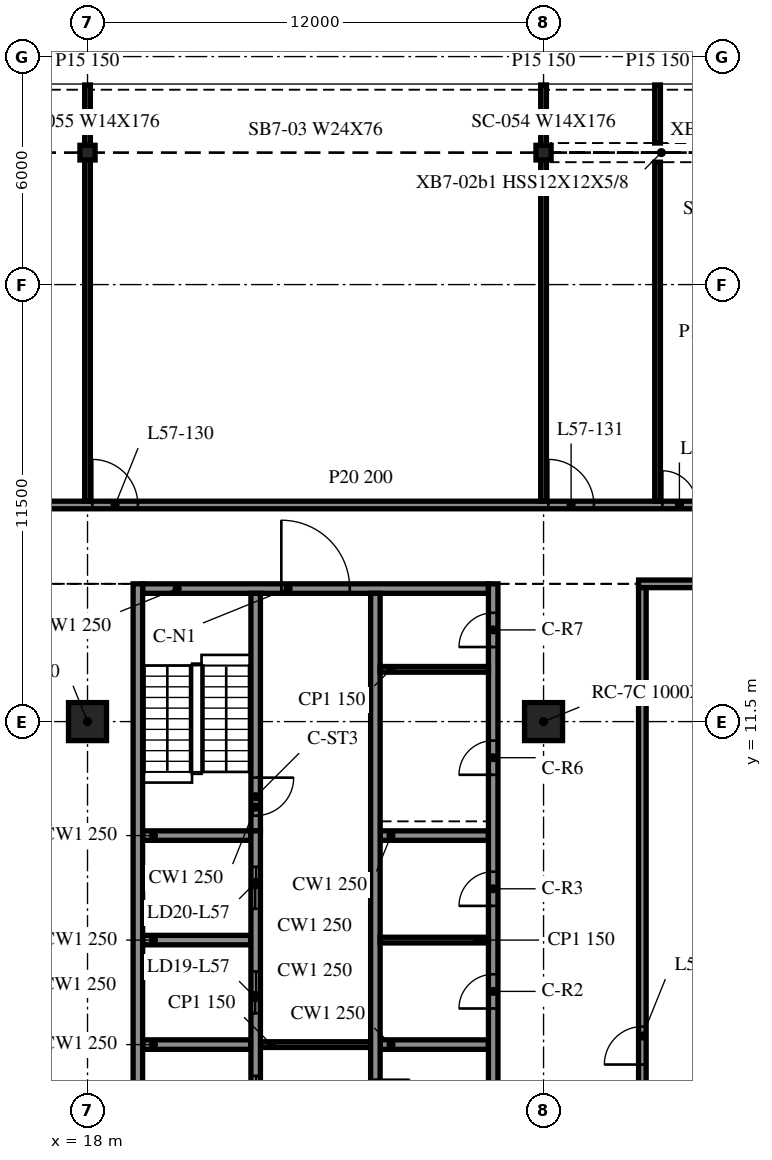
"""IFC4 building model, lengths in metres.
Left out: names, types, materials, properties, quantities, classifications, styles, units other than length and angle.
Written with IfcOpenShell. Run it as: python <this file> out.ifc"""

import sys

from ifc_helpers import new_model, si_unit, direction, frame, frame_2d, origin, origin_2d, place, context, subcontext, project, spatial, rectangle, i_section, extrude, element, fill, save


model = new_model("IFC4")
c1 = context("Model", 3, precision=1e-05, world=origin(), true_north=direction((0.0, 1.0)))
c2 = subcontext(c1, "Body", "Model", "MODEL_VIEW")
j1 = project(units=[si_unit("LENGTHUNIT", "METRE"), si_unit("PLANEANGLEUNIT", "RADIAN")], contexts=[c1])
p1 = place(None, origin())
s1 = spatial("IfcSite", under=j1, at=p1, CompositionType="ELEMENT")
p2 = place(p1, origin())
s2 = spatial("IfcBuilding", under=s1, at=p2, CompositionType="ELEMENT")
p3 = place(p2, frame((0.0, 0.0, 236.2)))
s3 = spatial("IfcBuildingStorey", under=s2, at=p3, CompositionType="ELEMENT", Elevation=236.2)
for number, where, z_axis, x_axis in (
    (1, (18.0, 11.5, -0.34), (0.0, 0.0, 1.0), (1.0, 0.0, 0.0)),
    (2, (30.0, 11.5, -0.34), (0.0, 0.0, 1.0), (1.0, 0.0, 0.0)),
):
    element("IfcColumn", number, at=place(p3, frame(where, z_axis=z_axis, x_axis=x_axis)), inside=s3, PredefinedType="COLUMN", context=c2, shape_type="SweptSolid", body=[
        extrude(rectangle(XDim=1.0, YDim=1.0, at=origin_2d()), origin(), (0.0, 0.0, 1.0), 3.8),
    ])
for number, where, z_axis, x_axis in (
    (3, (30.0, 26.473, -0.34), (0.0, 0.0, 1.0), (1.0, 0.0, 0.0)),
    (4, (18.0, 26.473, -0.34), (0.0, 0.0, 1.0), (1.0, 0.0, 0.0)),
):
    element("IfcColumn", number, at=place(p3, frame(where, z_axis=z_axis, x_axis=x_axis)), inside=s3, PredefinedType="COLUMN", context=c2, shape_type="SweptSolid", body=[
        extrude(i_section(OverallWidth=0.399, OverallDepth=0.386, WebThickness=0.021, FlangeThickness=0.033, at=origin_2d()), origin(), (0.0, 0.0, 1.0), 3.8),
    ])
p4 = place(p3, frame((19.325, 15.125, 0.0), z_axis=(0.0, 0.0, 1.0), x_axis=(0.0, -1.0, 0.0)))
e5 = element("IfcWall", 5, at=p4, inside=s3, PredefinedType="SOLIDWALL", context=c2, shape_type="SweptSolid", body=[
    extrude(rectangle(XDim=24.25, YDim=0.25, at=frame_2d((12.125, 0.0))), origin(), (0.0, 0.0, 1.0), 3.46),
])
p5 = place(p3, frame((28.675, -9.125, 0.0), z_axis=(0.0, 0.0, 1.0), x_axis=(0.0, 1.0, 0.0)))
e6 = element("IfcWall", 6, at=p5, inside=s3, PredefinedType="SOLIDWALL", context=c2, shape_type="SweptSolid", body=[
    extrude(rectangle(XDim=24.25, YDim=0.25, at=frame_2d((12.125, 0.0))), origin(), (0.0, 0.0, 1.0), 3.46),
])
p6 = place(p5, frame((13.075, 0.0, 0.0)))
e7 = element("IfcOpeningElement", 7, at=p6, cuts=e6, PredefinedType="OPENING", context=c2, shape_type="SweptSolid", body=[
    extrude(rectangle(XDim=0.9, YDim=2.1, at=frame_2d((0.45, 1.05))), frame((0.0, 0.135, 0.0), z_axis=(0.0, -1.0, 0.0), x_axis=(1.0, 0.0, 0.0)), (0.0, 0.0, 1.0), 0.27),
])
p7 = place(p5, frame((15.775, 0.0, 0.0)))
e8 = element("IfcOpeningElement", 8, at=p7, cuts=e6, PredefinedType="OPENING", context=c2, shape_type="SweptSolid", body=[
    extrude(rectangle(XDim=0.9, YDim=2.1, at=frame_2d((0.45, 1.05))), frame((0.0, 0.135, 0.0), z_axis=(0.0, -1.0, 0.0), x_axis=(1.0, 0.0, 0.0)), (0.0, 0.0, 1.0), 0.27),
])
p8 = place(p5, frame((19.225, 0.0, 0.0)))
e9 = element("IfcOpeningElement", 9, at=p8, cuts=e6, PredefinedType="OPENING", context=c2, shape_type="SweptSolid", body=[
    extrude(rectangle(XDim=0.9, YDim=2.1, at=frame_2d((0.45, 1.05))), frame((0.0, 0.135, 0.0), z_axis=(0.0, -1.0, 0.0), x_axis=(1.0, 0.0, 0.0)), (0.0, 0.0, 1.0), 0.27),
])
p9 = place(p5, frame((22.587, 0.0, 0.0)))
e10 = element("IfcOpeningElement", 10, at=p9, cuts=e6, PredefinedType="OPENING", context=c2, shape_type="SweptSolid", body=[
    extrude(rectangle(XDim=0.9, YDim=2.1, at=frame_2d((0.45, 1.05))), frame((0.0, 0.135, 0.0), z_axis=(0.0, -1.0, 0.0), x_axis=(1.0, 0.0, 0.0)), (0.0, 0.0, 1.0), 0.27),
])
p10 = place(p3, frame((19.45, 15.0, 0.0), z_axis=(0.0, 0.0, 1.0), x_axis=(1.0, 0.0, 0.0)))
e11 = element("IfcWall", 11, at=p10, inside=s3, PredefinedType="SOLIDWALL", context=c2, shape_type="SweptSolid", body=[
    extrude(rectangle(XDim=9.1, YDim=0.25, at=frame_2d((4.55, 0.0))), origin(), (0.0, 0.0, 1.0), 3.46),
])
p11 = place(p10, frame((3.65, 0.0, 0.0)))
e12 = element("IfcOpeningElement", 12, at=p11, cuts=e11, PredefinedType="OPENING", context=c2, shape_type="SweptSolid", body=[
    extrude(rectangle(XDim=1.8, YDim=2.1, at=frame_2d((0.9, 1.05))), frame((0.0, 0.135, 0.0), z_axis=(0.0, -1.0, 0.0), x_axis=(1.0, 0.0, 0.0)), (0.0, 0.0, 1.0), 0.27),
])
p12 = place(p3, frame((22.425, -8.875, 0.0), z_axis=(0.0, 0.0, 1.0), x_axis=(0.0, 1.0, 0.0)))
e13 = element("IfcWall", 13, at=p12, inside=s3, PredefinedType="SOLIDWALL", context=c2, shape_type="SweptSolid", body=[
    extrude(rectangle(XDim=17.5, YDim=0.25, at=frame_2d((8.75, 0.0))), origin(), (0.0, 0.0, 1.0), 3.46),
])
p13 = place(p12, frame((7.2, 0.0, 0.0)))
e14 = element("IfcOpeningElement", 14, at=p13, cuts=e13, PredefinedType="OPENING", context=c2, shape_type="SweptSolid", body=[
    extrude(rectangle(XDim=1.1, YDim=2.1, at=frame_2d((0.55, 1.05))), frame((0.0, 0.135, 0.0), z_axis=(0.0, -1.0, 0.0), x_axis=(1.0, 0.0, 0.0)), (0.0, 0.0, 1.0), 0.27),
])
p14 = place(p12, frame((9.95, 0.0, 0.0)))
e15 = element("IfcOpeningElement", 15, at=p14, cuts=e13, PredefinedType="OPENING", context=c2, shape_type="SweptSolid", body=[
    extrude(rectangle(XDim=1.1, YDim=2.1, at=frame_2d((0.55, 1.05))), frame((0.0, 0.135, 0.0), z_axis=(0.0, -1.0, 0.0), x_axis=(1.0, 0.0, 0.0)), (0.0, 0.0, 1.0), 0.27),
])
p15 = place(p12, frame((12.7, 0.0, 0.0)))
e16 = element("IfcOpeningElement", 16, at=p15, cuts=e13, PredefinedType="OPENING", context=c2, shape_type="SweptSolid", body=[
    extrude(rectangle(XDim=1.1, YDim=2.1, at=frame_2d((0.55, 1.05))), frame((0.0, 0.135, 0.0), z_axis=(0.0, -1.0, 0.0), x_axis=(1.0, 0.0, 0.0)), (0.0, 0.0, 1.0), 0.27),
])
p16 = place(p12, frame((15.45, 0.0, 0.0)))
e17 = element("IfcOpeningElement", 17, at=p16, cuts=e13, PredefinedType="OPENING", context=c2, shape_type="SweptSolid", body=[
    extrude(rectangle(XDim=1.1, YDim=2.1, at=frame_2d((0.55, 1.05))), frame((0.0, 0.135, 0.0), z_axis=(0.0, -1.0, 0.0), x_axis=(1.0, 0.0, 0.0)), (0.0, 0.0, 1.0), 0.27),
])
p17 = place(p12, frame((0.512, 0.0, 0.0)))
e18 = element("IfcOpeningElement", 18, at=p17, cuts=e13, PredefinedType="OPENING", context=c2, shape_type="SweptSolid", body=[
    extrude(rectangle(XDim=0.9, YDim=2.1, at=frame_2d((0.45, 1.05))), frame((0.0, 0.135, 0.0), z_axis=(0.0, -1.0, 0.0), x_axis=(1.0, 0.0, 0.0)), (0.0, 0.0, 1.0), 0.27),
])
p18 = place(p12, frame((3.587, 0.0, 0.0)))
e19 = element("IfcOpeningElement", 19, at=p18, cuts=e13, PredefinedType="OPENING", context=c2, shape_type="SweptSolid", body=[
    extrude(rectangle(XDim=0.9, YDim=2.1, at=frame_2d((0.45, 1.05))), frame((0.0, 0.135, 0.0), z_axis=(0.0, -1.0, 0.0), x_axis=(1.0, 0.0, 0.0)), (0.0, 0.0, 1.0), 0.27),
])
p19 = place(p3, frame((22.425, 14.875, 0.0), z_axis=(0.0, 0.0, 1.0), x_axis=(0.0, -1.0, 0.0)))
e20 = element("IfcWall", 20, at=p19, inside=s3, PredefinedType="SOLIDWALL", context=c2, shape_type="SweptSolid", body=[
    extrude(rectangle(XDim=6.25, YDim=0.25, at=frame_2d((3.125, 0.0))), origin(), (0.0, 0.0, 1.0), 3.46),
])
p20 = place(p19, frame((4.85, 0.0, 0.0)))
e21 = element("IfcOpeningElement", 21, at=p20, cuts=e20, PredefinedType="OPENING", context=c2, shape_type="SweptSolid", body=[
    extrude(rectangle(XDim=1.0, YDim=2.1, at=frame_2d((0.5, 1.05))), frame((0.0, 0.135, 0.0), z_axis=(0.0, -1.0, 0.0), x_axis=(1.0, 0.0, 0.0)), (0.0, 0.0, 1.0), 0.27),
])
p21 = place(p3, frame((25.575, 14.875, 0.0), z_axis=(0.0, 0.0, 1.0), x_axis=(0.0, -1.0, 0.0)))
e22 = element("IfcWall", 22, at=p21, inside=s3, PredefinedType="SOLIDWALL", context=c2, shape_type="SweptSolid", body=[
    extrude(rectangle(XDim=17.5, YDim=0.25, at=frame_2d((8.75, 0.0))), origin(), (0.0, 0.0, 1.0), 3.46),
])
p22 = place(p21, frame((15.45, 0.0, 0.0)))
e23 = element("IfcOpeningElement", 23, at=p22, cuts=e22, PredefinedType="OPENING", context=c2, shape_type="SweptSolid", body=[
    extrude(rectangle(XDim=1.1, YDim=2.1, at=frame_2d((0.55, 1.05))), frame((0.0, 0.135, 0.0), z_axis=(0.0, -1.0, 0.0), x_axis=(1.0, 0.0, 0.0)), (0.0, 0.0, 1.0), 0.27),
])
p23 = place(p21, frame((12.8, 0.0, 0.0)))
e24 = element("IfcOpeningElement", 24, at=p23, cuts=e22, PredefinedType="OPENING", context=c2, shape_type="SweptSolid", body=[
    extrude(rectangle(XDim=0.9, YDim=2.1, at=frame_2d((0.45, 1.05))), frame((0.0, 0.135, 0.0), z_axis=(0.0, -1.0, 0.0), x_axis=(1.0, 0.0, 0.0)), (0.0, 0.0, 1.0), 0.27),
])
for number, where, z_axis, x_axis in (
    (25, (19.45, 3.0, 0.0), (0.0, 0.0, 1.0), (1.0, 0.0, 0.0)),
    (26, (19.45, 5.75, 0.0), (0.0, 0.0, 1.0), (1.0, 0.0, 0.0)),
    (27, (19.45, 8.5, 0.0), (0.0, 0.0, 1.0), (1.0, 0.0, 0.0)),
    (28, (25.7, 3.0, 0.0), (0.0, 0.0, 1.0), (1.0, 0.0, 0.0)),
    (29, (25.7, 8.5, 0.0), (0.0, 0.0, 1.0), (1.0, 0.0, 0.0)),
):
    element("IfcWall", number, at=place(p3, frame(where, z_axis=z_axis, x_axis=x_axis)), inside=s3, PredefinedType="SOLIDWALL", context=c2, shape_type="SweptSolid", body=[
        extrude(rectangle(XDim=2.85, YDim=0.25, at=frame_2d((1.425, 0.0))), origin(), (0.0, 0.0, 1.0), 3.46),
    ])
p24 = place(p3, frame((22.55, 3.0, 0.0), z_axis=(0.0, 0.0, 1.0), x_axis=(1.0, 0.0, 0.0)))
e30 = element("IfcWall", 30, at=p24, inside=s3, PredefinedType="PARTITIONING", context=c2, shape_type="SweptSolid", body=[
    extrude(rectangle(XDim=2.9, YDim=0.15, at=frame_2d((1.45, 0.0))), origin(), (0.0, 0.0, 1.0), 3.46),
])
for number, where, z_axis, x_axis in (
    (31, (25.7, 5.75, 0.0), (0.0, 0.0, 1.0), (1.0, 0.0, 0.0)),
    (32, (25.7, 12.875, 0.0), (0.0, 0.0, 1.0), (1.0, 0.0, 0.0)),
):
    element("IfcWall", number, at=place(p3, frame(where, z_axis=z_axis, x_axis=x_axis)), inside=s3, PredefinedType="PARTITIONING", context=c2, shape_type="SweptSolid", body=[
        extrude(rectangle(XDim=2.85, YDim=0.15, at=frame_2d((1.425, 0.0))), origin(), (0.0, 0.0, 1.0), 3.46),
    ])
p25 = place(p3, frame((32.5, 15.125, 0.0), z_axis=(0.0, 0.0, 1.0), x_axis=(1.0, 0.0, 0.0)))
e33 = element("IfcWall", 33, at=p25, inside=s3, PredefinedType="PARTITIONING", context=c2, shape_type="SweptSolid", body=[
    extrude(rectangle(XDim=21.475, YDim=0.2, at=frame_2d((10.738, 0.0))), origin(), (0.0, 0.0, 1.0), 3.46),
])
p26 = place(p3, frame((-41.975, 17.2, 0.0), z_axis=(0.0, 0.0, 1.0), x_axis=(1.0, 0.0, 0.0)))
e34 = element("IfcWall", 34, at=p26, inside=s3, PredefinedType="PARTITIONING", context=c2, shape_type="SweptSolid", body=[
    extrude(rectangle(XDim=95.95, YDim=0.2, at=frame_2d((47.975, 0.0))), origin(), (0.0, 0.0, 1.0), 3.46),
])
p27 = place(p26, frame((10.7, 0.0, 0.0)))
e35 = element("IfcOpeningElement", 35, at=p27, cuts=e34, PredefinedType="OPENING", context=c2, shape_type="SweptSolid", body=[
    extrude(rectangle(XDim=0.9, YDim=2.1, at=frame_2d((0.45, 1.05))), frame((0.0, 0.11, 0.0), z_axis=(0.0, -1.0, 0.0), x_axis=(1.0, 0.0, 0.0)), (0.0, 0.0, 1.0), 0.22),
])
p28 = place(p26, frame((13.3, 0.0, 0.0)))
e36 = element("IfcOpeningElement", 36, at=p28, cuts=e34, PredefinedType="OPENING", context=c2, shape_type="SweptSolid", body=[
    extrude(rectangle(XDim=1.2, YDim=2.1, at=frame_2d((0.6, 1.05))), frame((0.0, 0.11, 0.0), z_axis=(0.0, -1.0, 0.0), x_axis=(1.0, 0.0, 0.0)), (0.0, 0.0, 1.0), 0.22),
])
p29 = place(p26, frame((22.7, 0.0, 0.0)))
e37 = element("IfcOpeningElement", 37, at=p29, cuts=e34, PredefinedType="OPENING", context=c2, shape_type="SweptSolid", body=[
    extrude(rectangle(XDim=0.9, YDim=2.1, at=frame_2d((0.45, 1.05))), frame((0.0, 0.11, 0.0), z_axis=(0.0, -1.0, 0.0), x_axis=(1.0, 0.0, 0.0)), (0.0, 0.0, 1.0), 0.22),
])
p30 = place(p26, frame((28.3, 0.0, 0.0)))
e38 = element("IfcOpeningElement", 38, at=p30, cuts=e34, PredefinedType="OPENING", context=c2, shape_type="SweptSolid", body=[
    extrude(rectangle(XDim=1.2, YDim=2.1, at=frame_2d((0.6, 1.05))), frame((0.0, 0.11, 0.0), z_axis=(0.0, -1.0, 0.0), x_axis=(1.0, 0.0, 0.0)), (0.0, 0.0, 1.0), 0.22),
])
p31 = place(p26, frame((40.3, 0.0, 0.0)))
e39 = element("IfcOpeningElement", 39, at=p31, cuts=e34, PredefinedType="OPENING", context=c2, shape_type="SweptSolid", body=[
    extrude(rectangle(XDim=1.2, YDim=2.1, at=frame_2d((0.6, 1.05))), frame((0.0, 0.11, 0.0), z_axis=(0.0, -1.0, 0.0), x_axis=(1.0, 0.0, 0.0)), (0.0, 0.0, 1.0), 0.22),
])
p32 = place(p26, frame((43.7, 0.0, 0.0)))
e40 = element("IfcOpeningElement", 40, at=p32, cuts=e34, PredefinedType="OPENING", context=c2, shape_type="SweptSolid", body=[
    extrude(rectangle(XDim=0.9, YDim=2.1, at=frame_2d((0.45, 1.05))), frame((0.0, 0.11, 0.0), z_axis=(0.0, -1.0, 0.0), x_axis=(1.0, 0.0, 0.0)), (0.0, 0.0, 1.0), 0.22),
])
p33 = place(p26, frame((47.3, 0.0, 0.0)))
e41 = element("IfcOpeningElement", 41, at=p33, cuts=e34, PredefinedType="OPENING", context=c2, shape_type="SweptSolid", body=[
    extrude(rectangle(XDim=1.2, YDim=2.1, at=frame_2d((0.6, 1.05))), frame((0.0, 0.11, 0.0), z_axis=(0.0, -1.0, 0.0), x_axis=(1.0, 0.0, 0.0)), (0.0, 0.0, 1.0), 0.22),
])
p34 = place(p26, frame((54.1, 0.0, 0.0)))
e42 = element("IfcOpeningElement", 42, at=p34, cuts=e34, PredefinedType="OPENING", context=c2, shape_type="SweptSolid", body=[
    extrude(rectangle(XDim=0.9, YDim=2.1, at=frame_2d((0.45, 1.05))), frame((0.0, 0.11, 0.0), z_axis=(0.0, -1.0, 0.0), x_axis=(1.0, 0.0, 0.0)), (0.0, 0.0, 1.0), 0.22),
])
p35 = place(p26, frame((60.1, 0.0, 0.0)))
e43 = element("IfcOpeningElement", 43, at=p35, cuts=e34, PredefinedType="OPENING", context=c2, shape_type="SweptSolid", body=[
    extrude(rectangle(XDim=1.2, YDim=2.1, at=frame_2d((0.6, 1.05))), frame((0.0, 0.11, 0.0), z_axis=(0.0, -1.0, 0.0), x_axis=(1.0, 0.0, 0.0)), (0.0, 0.0, 1.0), 0.22),
])
p36 = place(p26, frame((72.1, 0.0, 0.0)))
e44 = element("IfcOpeningElement", 44, at=p36, cuts=e34, PredefinedType="OPENING", context=c2, shape_type="SweptSolid", body=[
    extrude(rectangle(XDim=1.2, YDim=2.1, at=frame_2d((0.6, 1.05))), frame((0.0, 0.11, 0.0), z_axis=(0.0, -1.0, 0.0), x_axis=(1.0, 0.0, 0.0)), (0.0, 0.0, 1.0), 0.22),
])
p37 = place(p26, frame((75.1, 0.0, 0.0)))
e45 = element("IfcOpeningElement", 45, at=p37, cuts=e34, PredefinedType="OPENING", context=c2, shape_type="SweptSolid", body=[
    extrude(rectangle(XDim=0.9, YDim=2.1, at=frame_2d((0.45, 1.05))), frame((0.0, 0.11, 0.0), z_axis=(0.0, -1.0, 0.0), x_axis=(1.0, 0.0, 0.0)), (0.0, 0.0, 1.0), 0.22),
])
p38 = place(p26, frame((84.1, 0.0, 0.0)))
e46 = element("IfcOpeningElement", 46, at=p38, cuts=e34, PredefinedType="OPENING", context=c2, shape_type="SweptSolid", body=[
    extrude(rectangle(XDim=1.2, YDim=2.1, at=frame_2d((0.6, 1.05))), frame((0.0, 0.11, 0.0), z_axis=(0.0, -1.0, 0.0), x_axis=(1.0, 0.0, 0.0)), (0.0, 0.0, 1.0), 0.22),
])
p39 = place(p26, frame((90.1, 0.0, 0.0)))
e47 = element("IfcOpeningElement", 47, at=p39, cuts=e34, PredefinedType="OPENING", context=c2, shape_type="SweptSolid", body=[
    extrude(rectangle(XDim=0.9, YDim=2.1, at=frame_2d((0.45, 1.05))), frame((0.0, 0.11, 0.0), z_axis=(0.0, -1.0, 0.0), x_axis=(1.0, 0.0, 0.0)), (0.0, 0.0, 1.0), 0.22),
])
for number, where, z_axis, x_axis in (
    (48, (18.0, 17.3, 0.0), (0.0, 0.0, 1.0), (0.0, 1.0, 0.0)),
    (49, (30.0, 17.3, 0.0), (0.0, 0.0, 1.0), (0.0, 1.0, 0.0)),
):
    element("IfcWall", number, at=place(p3, frame(where, z_axis=z_axis, x_axis=x_axis)), inside=s3, PredefinedType="PARTITIONING", context=c2, shape_type="SweptSolid", body=[
        extrude(rectangle(XDim=10.953, YDim=0.15, at=frame_2d((5.477, 0.0))), origin(), (0.0, 0.0, 1.0), 3.46),
    ])
p40 = place(p3, frame((32.6, -9.025, 0.0), z_axis=(0.0, 0.0, 1.0), x_axis=(0.0, 1.0, 0.0)))
e50 = element("IfcWall", 50, at=p40, inside=s3, PredefinedType="PARTITIONING", context=c2, shape_type="SweptSolid", body=[
    extrude(rectangle(XDim=24.05, YDim=0.2, at=frame_2d((12.025, 0.0))), origin(), (0.0, 0.0, 1.0), 3.46),
])
p41 = place(p40, frame((11.5, 0.0, 0.0)))
e51 = element("IfcOpeningElement", 51, at=p41, cuts=e50, PredefinedType="OPENING", context=c2, shape_type="SweptSolid", body=[
    extrude(rectangle(XDim=1.0, YDim=2.1, at=frame_2d((0.5, 1.05))), frame((0.0, 0.11, 0.0), z_axis=(0.0, -1.0, 0.0), x_axis=(1.0, 0.0, 0.0)), (0.0, 0.0, 1.0), 0.22),
])
p42 = place(p3, frame((33.0, 17.3, 0.0), z_axis=(0.0, 0.0, 1.0), x_axis=(0.0, 1.0, 0.0)))
e52 = element("IfcWall", 52, at=p42, inside=s3, PredefinedType="PARTITIONING", context=c2, shape_type="SweptSolid", body=[
    extrude(rectangle(XDim=8.921, YDim=0.15, at=frame_2d((4.46, 0.0))), origin(), (0.0, 0.0, 1.0), 3.46),
])
p43 = place(p3, frame((33.0, 26.725, 0.0), z_axis=(0.0, 0.0, 1.0), x_axis=(0.0, 1.0, 0.0)))
e53 = element("IfcWall", 53, at=p43, inside=s3, PredefinedType="PARTITIONING", context=c2, shape_type="SweptSolid", body=[
    extrude(rectangle(XDim=1.528, YDim=0.15, at=frame_2d((0.764, 0.0))), origin(), (0.0, 0.0, 1.0), 3.46),
])
p44 = place(p11, origin())
e54 = element("IfcDoor", 54, at=p44, inside=s3, OperationType="DOUBLE_DOOR_SINGLE_SWING", PredefinedType="DOOR", context=c2, shape_type="SweptSolid", body=[
    extrude(rectangle(XDim=1.8, YDim=2.1, at=frame_2d((0.9, 1.05))), frame((0.0, 0.025, 0.0), z_axis=(0.0, -1.0, 0.0), x_axis=(1.0, 0.0, 0.0)), (0.0, 0.0, 1.0), 0.05),
])
fill(e12, e54)
p45 = place(p14, origin())
e55 = element("IfcDoor", 55, at=p45, inside=s3, OperationType="DOUBLE_DOOR_SLIDING", PredefinedType="DOOR", context=c2, shape_type="SweptSolid", body=[
    extrude(rectangle(XDim=1.1, YDim=2.1, at=frame_2d((0.55, 1.05))), frame((0.0, 0.025, 0.0), z_axis=(0.0, -1.0, 0.0), x_axis=(1.0, 0.0, 0.0)), (0.0, 0.0, 1.0), 0.05),
])
fill(e15, e55)
p46 = place(p15, origin())
e56 = element("IfcDoor", 56, at=p46, inside=s3, OperationType="DOUBLE_DOOR_SLIDING", PredefinedType="DOOR", context=c2, shape_type="SweptSolid", body=[
    extrude(rectangle(XDim=1.1, YDim=2.1, at=frame_2d((0.55, 1.05))), frame((0.0, 0.025, 0.0), z_axis=(0.0, -1.0, 0.0), x_axis=(1.0, 0.0, 0.0)), (0.0, 0.0, 1.0), 0.05),
])
fill(e16, e56)
p47 = place(p16, origin())
e57 = element("IfcDoor", 57, at=p47, inside=s3, OperationType="DOUBLE_DOOR_SLIDING", PredefinedType="DOOR", context=c2, shape_type="SweptSolid", body=[
    extrude(rectangle(XDim=1.1, YDim=2.1, at=frame_2d((0.55, 1.05))), frame((0.0, 0.025, 0.0), z_axis=(0.0, -1.0, 0.0), x_axis=(1.0, 0.0, 0.0)), (0.0, 0.0, 1.0), 0.05),
])
fill(e17, e57)
p48 = place(p6, origin())
e58 = element("IfcDoor", 58, at=p48, inside=s3, OperationType="SINGLE_SWING_RIGHT", PredefinedType="DOOR", context=c2, shape_type="SweptSolid", body=[
    extrude(rectangle(XDim=0.9, YDim=2.1, at=frame_2d((0.45, 1.05))), frame((0.0, 0.025, 0.0), z_axis=(0.0, -1.0, 0.0), x_axis=(1.0, 0.0, 0.0)), (0.0, 0.0, 1.0), 0.05),
])
fill(e7, e58)
p49 = place(p7, origin())
e59 = element("IfcDoor", 59, at=p49, inside=s3, OperationType="SINGLE_SWING_LEFT", PredefinedType="DOOR", context=c2, shape_type="SweptSolid", body=[
    extrude(rectangle(XDim=0.9, YDim=2.1, at=frame_2d((0.45, 1.05))), frame((0.0, 0.025, 0.0), z_axis=(0.0, -1.0, 0.0), x_axis=(1.0, 0.0, 0.0)), (0.0, 0.0, 1.0), 0.05),
])
fill(e8, e59)
p50 = place(p8, origin())
e60 = element("IfcDoor", 60, at=p50, inside=s3, OperationType="SINGLE_SWING_RIGHT", PredefinedType="DOOR", context=c2, shape_type="SweptSolid", body=[
    extrude(rectangle(XDim=0.9, YDim=2.1, at=frame_2d((0.45, 1.05))), frame((0.0, 0.025, 0.0), z_axis=(0.0, -1.0, 0.0), x_axis=(1.0, 0.0, 0.0)), (0.0, 0.0, 1.0), 0.05),
])
fill(e9, e60)
p51 = place(p9, origin())
e61 = element("IfcDoor", 61, at=p51, inside=s3, OperationType="SINGLE_SWING_LEFT", PredefinedType="DOOR", context=c2, shape_type="SweptSolid", body=[
    extrude(rectangle(XDim=0.9, YDim=2.1, at=frame_2d((0.45, 1.05))), frame((0.0, 0.025, 0.0), z_axis=(0.0, -1.0, 0.0), x_axis=(1.0, 0.0, 0.0)), (0.0, 0.0, 1.0), 0.05),
])
fill(e10, e61)
p52 = place(p20, origin())
e62 = element("IfcDoor", 62, at=p52, inside=s3, OperationType="SINGLE_SWING_RIGHT", PredefinedType="DOOR", context=c2, shape_type="SweptSolid", body=[
    extrude(rectangle(XDim=1.0, YDim=2.1, at=frame_2d((0.5, 1.05))), frame((0.0, 0.025, 0.0), z_axis=(0.0, -1.0, 0.0), x_axis=(1.0, 0.0, 0.0)), (0.0, 0.0, 1.0), 0.05),
])
fill(e21, e62)
p53 = place(p41, origin())
e63 = element("IfcDoor", 63, at=p53, inside=s3, OperationType="SINGLE_SWING_RIGHT", PredefinedType="DOOR", context=c2, shape_type="SweptSolid", body=[
    extrude(rectangle(XDim=1.0, YDim=2.1, at=frame_2d((0.5, 1.05))), frame((0.0, 0.025, 0.0), z_axis=(0.0, -1.0, 0.0), x_axis=(1.0, 0.0, 0.0)), (0.0, 0.0, 1.0), 0.05),
])
fill(e51, e63)
p54 = place(p35, origin())
e64 = element("IfcDoor", 64, at=p54, inside=s3, OperationType="SINGLE_SWING_RIGHT", PredefinedType="DOOR", context=c2, shape_type="SweptSolid", body=[
    extrude(rectangle(XDim=1.2, YDim=2.1, at=frame_2d((0.6, 1.05))), frame((0.0, 0.025, 0.0), z_axis=(0.0, -1.0, 0.0), x_axis=(1.0, 0.0, 0.0)), (0.0, 0.0, 1.0), 0.05),
])
fill(e43, e64)
p55 = place(p36, origin())
e65 = element("IfcDoor", 65, at=p55, inside=s3, OperationType="SINGLE_SWING_RIGHT", PredefinedType="DOOR", context=c2, shape_type="SweptSolid", body=[
    extrude(rectangle(XDim=1.2, YDim=2.1, at=frame_2d((0.6, 1.05))), frame((0.0, 0.025, 0.0), z_axis=(0.0, -1.0, 0.0), x_axis=(1.0, 0.0, 0.0)), (0.0, 0.0, 1.0), 0.05),
])
fill(e44, e65)
p56 = place(p37, origin())
e66 = element("IfcDoor", 66, at=p56, inside=s3, OperationType="SINGLE_SWING_RIGHT", PredefinedType="DOOR", context=c2, shape_type="SweptSolid", body=[
    extrude(rectangle(XDim=0.9, YDim=2.1, at=frame_2d((0.45, 1.05))), frame((0.0, 0.025, 0.0), z_axis=(0.0, -1.0, 0.0), x_axis=(1.0, 0.0, 0.0)), (0.0, 0.0, 1.0), 0.05),
])
fill(e45, e66)
save(model, sys.argv[1])
